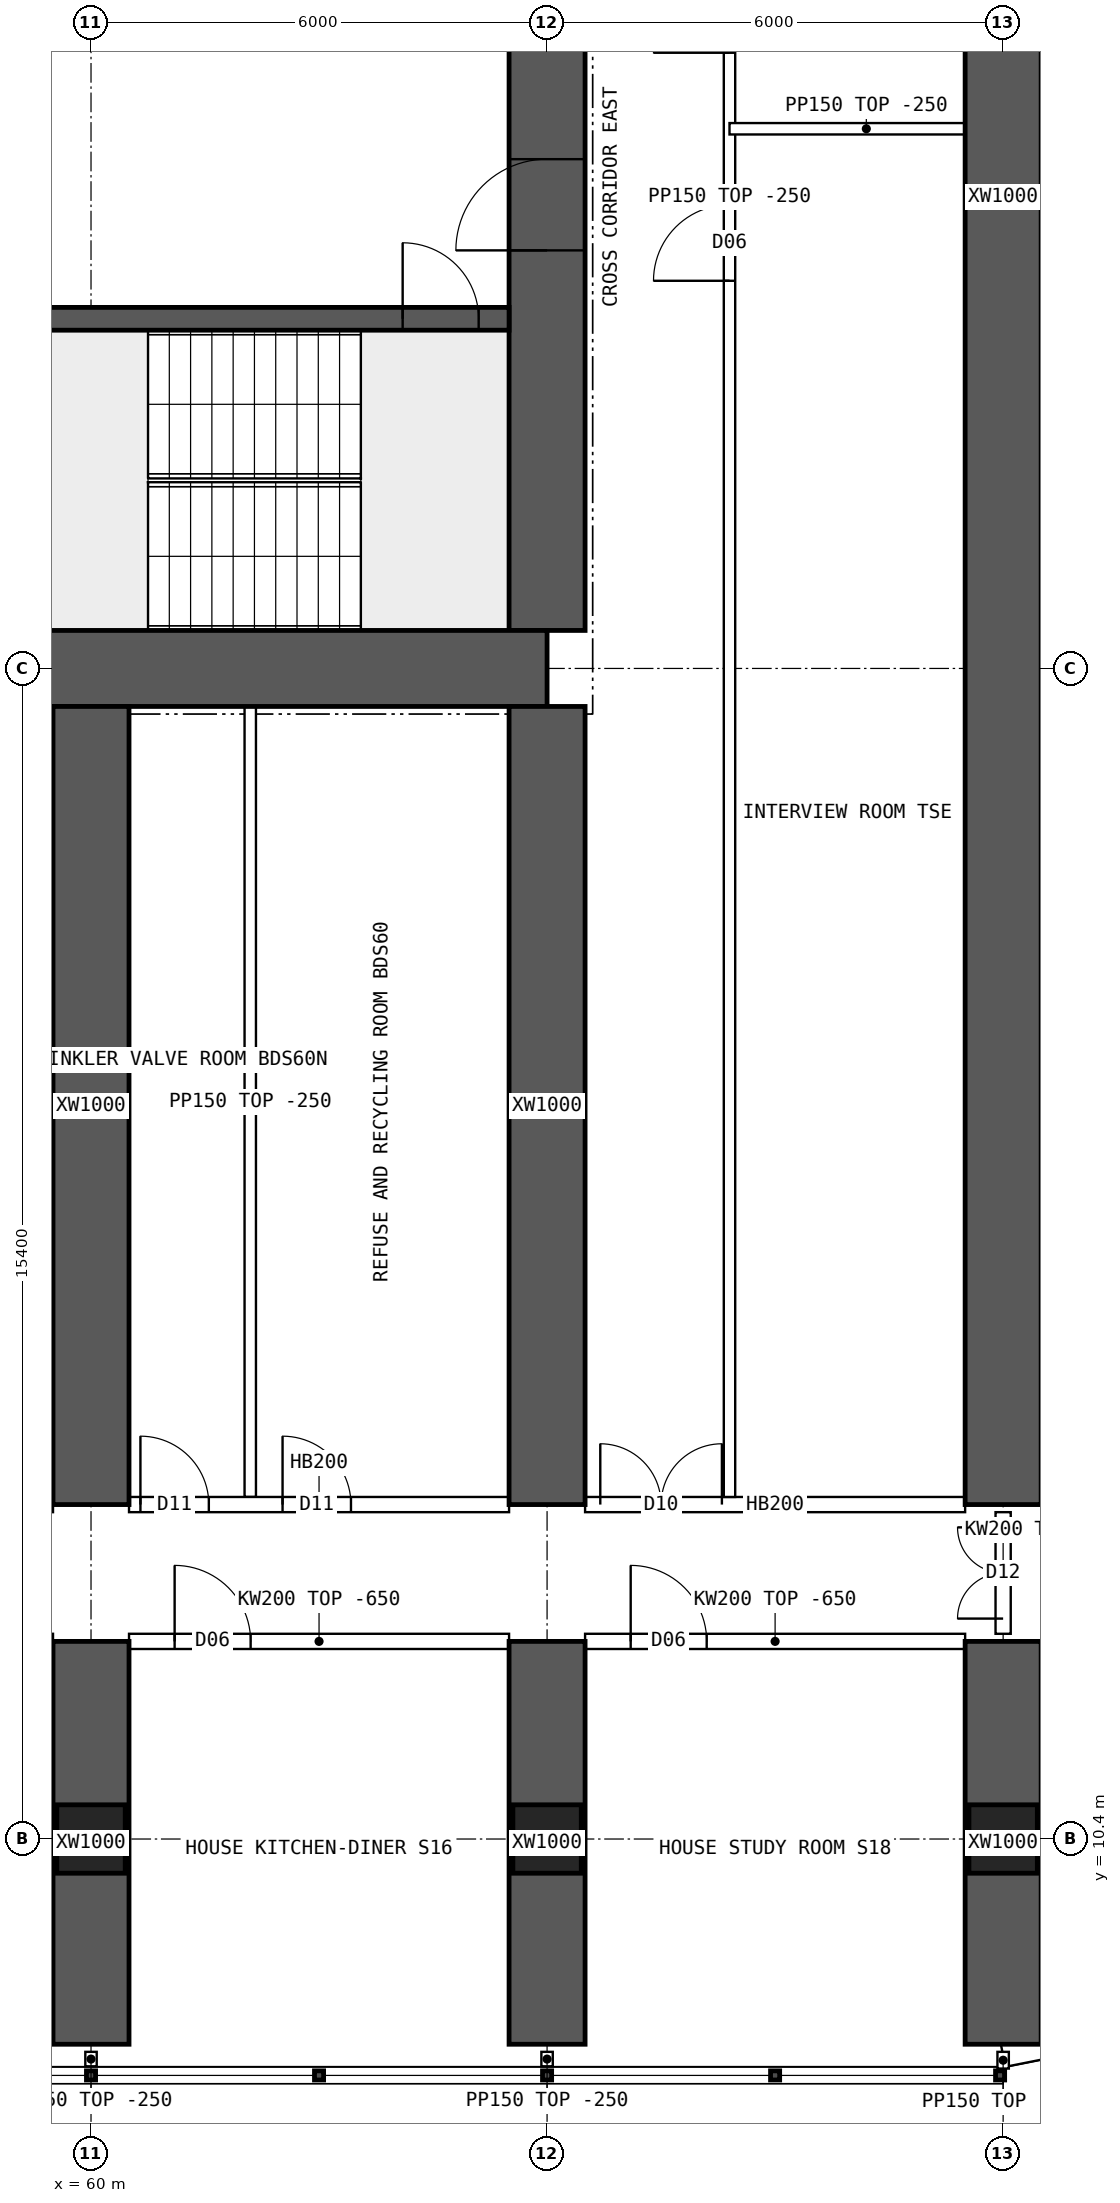
"""IFC4 building model, lengths in metres.
Left out: names, types, materials, properties, quantities, classifications, styles, units other than length and angle.
Written with IfcOpenShell. Run it as: python <this file> out.ifc"""

import sys

from ifc_helpers import new_model, si_unit, direction, frame, frame_2d, origin, origin_2d, place, context, subcontext, project, spatial, polyline, rectangle, hollow_rectangle, outline, extrude, element, fill, save


model = new_model("IFC4")
c1 = context("Model", 3, precision=1e-05, world=origin(), true_north=direction((0.0, 1.0)))
c2 = subcontext(c1, "Body", "Model", "MODEL_VIEW")
j1 = project(units=[si_unit("LENGTHUNIT", "METRE"), si_unit("PLANEANGLEUNIT", "RADIAN")], contexts=[c1])
p1 = place(None, origin())
s1 = spatial("IfcSite", under=j1, at=p1, CompositionType="ELEMENT")
p2 = place(p1, origin())
s2 = spatial("IfcBuilding", under=s1, at=p2, CompositionType="ELEMENT")
p3 = place(p2, frame((0.0, 0.0, 53.95)))
s3 = spatial("IfcBuildingStorey", under=s2, at=p3, CompositionType="ELEMENT", Elevation=53.95)
for number, where, z_axis, x_axis in (
    (1, (60.0, 10.4, 0.0), (0.0, 0.0, 1.0), (1.0, 0.0, 0.0)),
    (2, (66.0, 10.4, 0.0), (0.0, 0.0, 1.0), (1.0, 0.0, 0.0)),
    (3, (72.0, 10.4, 0.0), (0.0, 0.0, 1.0), (1.0, 0.0, 0.0)),
):
    element("IfcColumn", number, at=place(p3, frame(where, z_axis=z_axis, x_axis=x_axis)), inside=s3, PredefinedType="COLUMN", context=c2, shape_type="SweptSolid", body=[
        extrude(hollow_rectangle(XDim=0.9, YDim=0.9, WallThickness=0.09, at=origin_2d()), origin(), (0.0, 0.0, 1.0), 3.75),
    ])
p4 = place(p3, frame((18.0, 25.8, 0.0), z_axis=(0.0, 0.0, 1.0), x_axis=(1.0, 0.0, 0.0)))
e4 = element("IfcWall", 4, at=p4, inside=s3, PredefinedType="SHEAR", context=c2, shape_type="SweptSolid", body=[
    extrude(rectangle(XDim=48.0, YDim=1.0, at=frame_2d((24.0, 0.0))), origin(), (0.0, 0.0, 1.0), 3.75),
])
p5 = place(p3, frame((66.0, 26.3, 0.0), z_axis=(0.0, 0.0, 1.0), x_axis=(0.0, 1.0, 0.0)))
e5 = element("IfcWall", 5, at=p5, inside=s3, PredefinedType="SHEAR", context=c2, shape_type="SweptSolid", body=[
    extrude(rectangle(XDim=11.4, YDim=1.0, at=frame_2d((5.7, 0.0))), origin(), (0.0, 0.0, 1.0), 3.75),
])
p6 = place(p5, frame((5.0, 0.0, 0.0)))
e6 = element("IfcOpeningElement", 6, at=p6, cuts=e5, PredefinedType="OPENING", context=c2, shape_type="SweptSolid", body=[
    extrude(rectangle(XDim=1.2, YDim=2.1, at=frame_2d((0.6, 1.05))), frame((0.0, 0.51, 0.0), z_axis=(0.0, -1.0, 0.0), x_axis=(1.0, 0.0, 0.0)), (0.0, 0.0, 1.0), 1.02),
])
p7 = place(p3, frame((18.5, 30.4, 0.0), z_axis=(0.0, 0.0, 1.0), x_axis=(1.0, 0.0, 0.0)))
e7 = element("IfcWall", 7, at=p7, inside=s3, PredefinedType="SHEAR", context=c2, shape_type="SweptSolid", body=[
    extrude(rectangle(XDim=47.0, YDim=0.3, at=frame_2d((23.5, 0.0))), origin(), (0.0, 0.0, 1.0), 3.75),
])
p8 = place(p7, frame((0.4, 0.0, 0.0)))
e8 = element("IfcOpeningElement", 8, at=p8, cuts=e7, PredefinedType="OPENING", context=c2, shape_type="SweptSolid", body=[
    extrude(rectangle(XDim=1.0, YDim=2.1, at=frame_2d((0.5, 1.05))), frame((0.0, 0.16, 0.0), z_axis=(0.0, -1.0, 0.0), x_axis=(1.0, 0.0, 0.0)), (0.0, 0.0, 1.0), 0.32),
])
p9 = place(p7, frame((45.6, 0.0, 0.0)))
e9 = element("IfcOpeningElement", 9, at=p9, cuts=e7, PredefinedType="OPENING", context=c2, shape_type="SweptSolid", body=[
    extrude(rectangle(XDim=1.0, YDim=2.1, at=frame_2d((0.5, 1.05))), frame((0.0, 0.16, 0.0), z_axis=(0.0, -1.0, 0.0), x_axis=(1.0, 0.0, 0.0)), (0.0, 0.0, 1.0), 0.32),
])
p10 = place(p7, frame((8.25, 0.0, 0.0)))
e10 = element("IfcOpeningElement", 10, at=p10, cuts=e7, PredefinedType="OPENING", context=c2, shape_type="SweptSolid", body=[
    extrude(rectangle(XDim=1.1, YDim=2.1, at=frame_2d((0.55, 1.05))), frame((0.0, 0.16, 0.0), z_axis=(0.0, -1.0, 0.0), x_axis=(1.0, 0.0, 0.0)), (0.0, 0.0, 1.0), 0.32),
])
p11 = place(p7, frame((10.85, 0.0, 0.0)))
e11 = element("IfcOpeningElement", 11, at=p11, cuts=e7, PredefinedType="OPENING", context=c2, shape_type="SweptSolid", body=[
    extrude(rectangle(XDim=1.1, YDim=2.1, at=frame_2d((0.55, 1.05))), frame((0.0, 0.16, 0.0), z_axis=(0.0, -1.0, 0.0), x_axis=(1.0, 0.0, 0.0)), (0.0, 0.0, 1.0), 0.32),
])
p12 = place(p7, frame((13.45, 0.0, 0.0)))
e12 = element("IfcOpeningElement", 12, at=p12, cuts=e7, PredefinedType="OPENING", context=c2, shape_type="SweptSolid", body=[
    extrude(rectangle(XDim=1.1, YDim=2.1, at=frame_2d((0.55, 1.05))), frame((0.0, 0.16, 0.0), z_axis=(0.0, -1.0, 0.0), x_axis=(1.0, 0.0, 0.0)), (0.0, 0.0, 1.0), 0.32),
])
p13 = place(p7, frame((16.05, 0.0, 0.0)))
e13 = element("IfcOpeningElement", 13, at=p13, cuts=e7, PredefinedType="OPENING", context=c2, shape_type="SweptSolid", body=[
    extrude(rectangle(XDim=1.1, YDim=2.1, at=frame_2d((0.55, 1.05))), frame((0.0, 0.16, 0.0), z_axis=(0.0, -1.0, 0.0), x_axis=(1.0, 0.0, 0.0)), (0.0, 0.0, 1.0), 0.32),
])
p14 = place(p7, frame((30.117, 0.0, 0.0)))
e14 = element("IfcOpeningElement", 14, at=p14, cuts=e7, PredefinedType="OPENING", context=c2, shape_type="SweptSolid", body=[
    extrude(rectangle(XDim=1.1, YDim=2.1, at=frame_2d((0.55, 1.05))), frame((0.0, 0.16, 0.0), z_axis=(0.0, -1.0, 0.0), x_axis=(1.0, 0.0, 0.0)), (0.0, 0.0, 1.0), 0.32),
])
p15 = place(p7, frame((33.65, 0.0, 0.0)))
e15 = element("IfcOpeningElement", 15, at=p15, cuts=e7, PredefinedType="OPENING", context=c2, shape_type="SweptSolid", body=[
    extrude(rectangle(XDim=1.1, YDim=2.1, at=frame_2d((0.55, 1.05))), frame((0.0, 0.16, 0.0), z_axis=(0.0, -1.0, 0.0), x_axis=(1.0, 0.0, 0.0)), (0.0, 0.0, 1.0), 0.32),
])
p16 = place(p7, frame((37.183, 0.0, 0.0)))
e16 = element("IfcOpeningElement", 16, at=p16, cuts=e7, PredefinedType="OPENING", context=c2, shape_type="SweptSolid", body=[
    extrude(rectangle(XDim=1.1, YDim=2.1, at=frame_2d((0.55, 1.05))), frame((0.0, 0.16, 0.0), z_axis=(0.0, -1.0, 0.0), x_axis=(1.0, 0.0, 0.0)), (0.0, 0.0, 1.0), 0.32),
])
p17 = place(p3, frame((60.0, 7.7, 0.0), z_axis=(0.0, 0.0, 1.0), x_axis=(0.0, 1.0, 0.0)))
e17 = element("IfcWall", 17, at=p17, inside=s3, PredefinedType="SHEAR", context=c2, shape_type="SweptSolid", body=[
    extrude(rectangle(XDim=5.3, YDim=1.0, at=frame_2d((2.65, 0.0))), origin(), (0.0, 0.0, 1.0), 3.75),
])
p18 = place(p3, frame((60.0, 14.8, 0.0), z_axis=(0.0, 0.0, 1.0), x_axis=(0.0, 1.0, 0.0)))
e18 = element("IfcWall", 18, at=p18, inside=s3, PredefinedType="SHEAR", context=c2, shape_type="SweptSolid", body=[
    extrude(rectangle(XDim=10.5, YDim=1.0, at=frame_2d((5.25, 0.0))), origin(), (0.0, 0.0, 1.0), 3.75),
])
p19 = place(p3, frame((66.0, 7.7, 0.0), z_axis=(0.0, 0.0, 1.0), x_axis=(0.0, 1.0, 0.0)))
e19 = element("IfcWall", 19, at=p19, inside=s3, PredefinedType="SHEAR", context=c2, shape_type="SweptSolid", body=[
    extrude(rectangle(XDim=5.3, YDim=1.0, at=frame_2d((2.65, 0.0))), origin(), (0.0, 0.0, 1.0), 3.75),
])
p20 = place(p3, frame((66.0, 14.8, 0.0), z_axis=(0.0, 0.0, 1.0), x_axis=(0.0, 1.0, 0.0)))
e20 = element("IfcWall", 20, at=p20, inside=s3, PredefinedType="SHEAR", context=c2, shape_type="SweptSolid", body=[
    extrude(rectangle(XDim=10.5, YDim=1.0, at=frame_2d((5.25, 0.0))), origin(), (0.0, 0.0, 1.0), 3.75),
])
p21 = place(p3, frame((72.0, 7.7, 0.0), z_axis=(0.0, 0.0, 1.0), x_axis=(0.0, 1.0, 0.0)))
e21 = element("IfcWall", 21, at=p21, inside=s3, PredefinedType="SHEAR", context=c2, shape_type="SweptSolid", body=[
    extrude(rectangle(XDim=5.3, YDim=1.0, at=frame_2d((2.65, 0.0))), origin(), (0.0, 0.0, 1.0), 3.75),
])
p22 = place(p3, frame((72.0, 14.8, 0.0), z_axis=(0.0, 0.0, 1.0), x_axis=(0.0, 1.0, 0.0)))
e22 = element("IfcWall", 22, at=p22, inside=s3, PredefinedType="SHEAR", context=c2, shape_type="SweptSolid", body=[
    extrude(rectangle(XDim=34.4, YDim=1.0, at=frame_2d((17.2, 0.0))), origin(), (0.0, 0.0, 1.0), 3.75),
])
p23 = place(p3, frame((72.0, 7.55, 0.0), z_axis=(0.0, 0.0, 1.0), x_axis=(0.980787251524, 0.195080412259, 0.0)))
e23 = element("IfcWall", 23, at=p23, inside=s3, PredefinedType="SOLIDWALL", context=c2, shape_type="SweptSolid", body=[
    extrude(outline(polyline([(-0.03, -0.15), (3.249, -0.15), (3.189, 0.15), (0.03, 0.15), (-0.03, -0.15)])), origin(), (0.0, 0.0, 1.0), 3.5),
])
p24 = place(p23, frame((0.909, 0.0, 0.9)))
e24 = element("IfcOpeningElement", 24, at=p24, cuts=e23, PredefinedType="OPENING", context=c2, shape_type="SweptSolid", body=[
    extrude(rectangle(XDim=1.4, YDim=1.8, at=frame_2d((0.7, 0.9))), frame((0.0, 0.16, 0.0), z_axis=(0.0, -1.0, 0.0), x_axis=(1.0, 0.0, 0.0)), (0.0, 0.0, 1.0), 0.32),
])
p25 = place(p3, frame((60.5, 13.0, 0.0), z_axis=(0.0, 0.0, 1.0), x_axis=(1.0, 0.0, 0.0)))
e25 = element("IfcWall", 25, at=p25, inside=s3, PredefinedType="SOLIDWALL", context=c2, shape_type="SweptSolid", body=[
    extrude(outline(polyline([(0.0, 0.0), (5.0, 0.0), (5.0, 3.1), (0.0, 3.1), (0.0, 0.0)])), frame((0.0, 0.1, 0.0), z_axis=(0.0, -1.0, 0.0), x_axis=(1.0, 0.0, 0.0)), (0.0, 0.0, 1.0), 0.2),
])
p26 = place(p25, frame((0.6, 0.0, 0.0)))
e26 = element("IfcOpeningElement", 26, at=p26, cuts=e25, PredefinedType="OPENING", context=c2, shape_type="SweptSolid", body=[
    extrude(rectangle(XDim=1.0, YDim=2.1, at=frame_2d((0.5, 1.05))), frame((0.0, 0.11, 0.0), z_axis=(0.0, -1.0, 0.0), x_axis=(1.0, 0.0, 0.0)), (0.0, 0.0, 1.0), 0.22),
])
p27 = place(p3, frame((60.5, 14.8, 0.0), z_axis=(0.0, 0.0, 1.0), x_axis=(1.0, 0.0, 0.0)))
e27 = element("IfcWall", 27, at=p27, inside=s3, PredefinedType="SOLIDWALL", context=c2, shape_type="SweptSolid", body=[
    extrude(rectangle(XDim=5.0, YDim=0.2, at=frame_2d((2.5, 0.0))), origin(), (0.0, 0.0, 1.0), 3.5),
])
p28 = place(p27, frame((0.15, 0.0, 0.0)))
e28 = element("IfcOpeningElement", 28, at=p28, cuts=e27, PredefinedType="OPENING", context=c2, shape_type="SweptSolid", body=[
    extrude(rectangle(XDim=0.9, YDim=2.1, at=frame_2d((0.45, 1.05))), frame((0.0, 0.11, 0.0), z_axis=(0.0, -1.0, 0.0), x_axis=(1.0, 0.0, 0.0)), (0.0, 0.0, 1.0), 0.22),
])
p29 = place(p27, frame((2.02, 0.0, 0.0)))
e29 = element("IfcOpeningElement", 29, at=p29, cuts=e27, PredefinedType="OPENING", context=c2, shape_type="SweptSolid", body=[
    extrude(rectangle(XDim=0.9, YDim=2.1, at=frame_2d((0.45, 1.05))), frame((0.0, 0.11, 0.0), z_axis=(0.0, -1.0, 0.0), x_axis=(1.0, 0.0, 0.0)), (0.0, 0.0, 1.0), 0.22),
])
p30 = place(p3, frame((66.5, 13.0, 0.0), z_axis=(0.0, 0.0, 1.0), x_axis=(1.0, 0.0, 0.0)))
e30 = element("IfcWall", 30, at=p30, inside=s3, PredefinedType="SOLIDWALL", context=c2, shape_type="SweptSolid", body=[
    extrude(outline(polyline([(0.0, 0.0), (5.0, 0.0), (5.0, 3.1), (0.0, 3.1), (0.0, 0.0)])), frame((0.0, 0.1, 0.0), z_axis=(0.0, -1.0, 0.0), x_axis=(1.0, 0.0, 0.0)), (0.0, 0.0, 1.0), 0.2),
])
p31 = place(p30, frame((0.6, 0.0, 0.0)))
e31 = element("IfcOpeningElement", 31, at=p31, cuts=e30, PredefinedType="OPENING", context=c2, shape_type="SweptSolid", body=[
    extrude(rectangle(XDim=1.0, YDim=2.1, at=frame_2d((0.5, 1.05))), frame((0.0, 0.11, 0.0), z_axis=(0.0, -1.0, 0.0), x_axis=(1.0, 0.0, 0.0)), (0.0, 0.0, 1.0), 0.22),
])
p32 = place(p3, frame((66.5, 14.8, 0.0), z_axis=(0.0, 0.0, 1.0), x_axis=(1.0, 0.0, 0.0)))
e32 = element("IfcWall", 32, at=p32, inside=s3, PredefinedType="SOLIDWALL", context=c2, shape_type="SweptSolid", body=[
    extrude(rectangle(XDim=5.0, YDim=0.2, at=frame_2d((2.5, 0.0))), origin(), (0.0, 0.0, 1.0), 3.5),
])
p33 = place(p32, frame((0.2, 0.0, 0.0)))
e33 = element("IfcOpeningElement", 33, at=p33, cuts=e32, PredefinedType="OPENING", context=c2, shape_type="SweptSolid", body=[
    extrude(rectangle(XDim=1.6, YDim=2.1, at=frame_2d((0.8, 1.05))), frame((0.0, 0.11, 0.0), z_axis=(0.0, -1.0, 0.0), x_axis=(1.0, 0.0, 0.0)), (0.0, 0.0, 1.0), 0.22),
])
p34 = place(p3, frame((62.095, 14.9, 0.0), z_axis=(0.0, 0.0, 1.0), x_axis=(0.0, 1.0, 0.0)))
e34 = element("IfcWall", 34, at=p34, inside=s3, PredefinedType="PARTITIONING", context=c2, shape_type="SweptSolid", body=[
    extrude(rectangle(XDim=10.4, YDim=0.15, at=frame_2d((5.2, 0.0))), origin(), (0.0, 0.0, 1.0), 3.5),
])
p35 = place(p3, frame((68.4, 14.9, 0.0), z_axis=(0.0, 0.0, 1.0), x_axis=(0.0, 1.0, 0.0)))
e35 = element("IfcWall", 35, at=p35, inside=s3, PredefinedType="PARTITIONING", context=c2, shape_type="SweptSolid", body=[
    extrude(rectangle(XDim=34.2, YDim=0.15, at=frame_2d((17.1, 0.0))), origin(), (0.0, 0.0, 1.0), 3.5),
])
p36 = place(p35, frame((16.0, 0.0, 0.0)))
e36 = element("IfcOpeningElement", 36, at=p36, cuts=e35, PredefinedType="OPENING", context=c2, shape_type="SweptSolid", body=[
    extrude(rectangle(XDim=1.0, YDim=2.1, at=frame_2d((0.5, 1.05))), frame((0.0, 0.085, 0.0), z_axis=(0.0, -1.0, 0.0), x_axis=(1.0, 0.0, 0.0)), (0.0, 0.0, 1.0), 0.17),
])
p37 = place(p35, frame((19.0, 0.0, 0.0)))
e37 = element("IfcOpeningElement", 37, at=p37, cuts=e35, PredefinedType="OPENING", context=c2, shape_type="SweptSolid", body=[
    extrude(rectangle(XDim=1.0, YDim=2.1, at=frame_2d((0.5, 1.05))), frame((0.0, 0.085, 0.0), z_axis=(0.0, -1.0, 0.0), x_axis=(1.0, 0.0, 0.0)), (0.0, 0.0, 1.0), 0.17),
])
p38 = place(p3, frame((68.4, 32.9, 0.0), z_axis=(0.0, 0.0, 1.0), x_axis=(1.0, 0.0, 0.0)))
e38 = element("IfcWall", 38, at=p38, inside=s3, PredefinedType="PARTITIONING", context=c2, shape_type="SweptSolid", body=[
    extrude(rectangle(XDim=3.6, YDim=0.15, at=frame_2d((1.8, 0.0))), origin(), (0.0, 0.0, 1.0), 3.5),
])
p39 = place(p3, frame((72.075, 30.85, 0.0), z_axis=(0.0, 0.0, 1.0), x_axis=(1.0, 0.0, 0.0)))
e39 = element("IfcWall", 39, at=p39, inside=s3, PredefinedType="PARTITIONING", context=c2, shape_type="SweptSolid", body=[
    extrude(outline(polyline([(0.0, 0.0), (8.02, 0.0), (8.02, 3.5), (6.227, 3.5), (6.225, 3.05), (5.627, 3.05), (5.625, 3.5), (0.0, 3.5), (0.0, 0.0)])), frame((0.0, 0.075, 0.0), z_axis=(0.0, -1.0, 0.0), x_axis=(1.0, 0.0, 0.0)), (0.0, 0.0, 1.0), 0.15),
])
p40 = place(p3, frame((72.0, 13.1, 0.0), z_axis=(0.0, 0.0, 1.0), x_axis=(0.0, 1.0, 0.0)))
e40 = element("IfcWall", 40, at=p40, inside=s3, PredefinedType="SOLIDWALL", context=c2, shape_type="SweptSolid", body=[
    extrude(outline(polyline([(0.0, 0.0), (1.6, 0.0), (1.6, 3.05), (0.0, 3.05), (0.0, 0.0)])), frame((0.0, 0.1, 0.0), z_axis=(0.0, -1.0, 0.0), x_axis=(1.0, 0.0, 0.0)), (0.0, 0.0, 1.0), 0.2),
])
p41 = place(p40, frame((0.2, 0.0, 0.0)))
e41 = element("IfcOpeningElement", 41, at=p41, cuts=e40, PredefinedType="OPENING", context=c2, shape_type="SweptSolid", body=[
    extrude(rectangle(XDim=1.2, YDim=2.1, at=frame_2d((0.6, 1.05))), frame((0.0, 0.11, 0.0), z_axis=(0.0, -1.0, 0.0), x_axis=(1.0, 0.0, 0.0)), (0.0, 0.0, 1.0), 0.22),
])
for number, where, z_axis, x_axis in (
    (42, (60.0, 7.6, 0.0), (0.0, 0.0, 1.0), (0.0, -1.0, 0.0)),
    (43, (66.0, 7.6, 0.0), (0.0, 0.0, 1.0), (0.0, -1.0, 0.0)),
):
    element("IfcWall", number, at=place(p3, frame(where, z_axis=z_axis, x_axis=x_axis)), inside=s3, PredefinedType="PARTITIONING", context=c2, shape_type="SweptSolid", body=[
        extrude(rectangle(XDim=0.19, YDim=0.15, at=frame_2d((0.095, 0.0))), origin(), (0.0, 0.0, 1.0), 3.5),
    ])
p42 = place(p3, frame((72.0, 7.6, 0.0), z_axis=(0.0, 0.0, 1.0), x_axis=(0.0, -1.0, 0.0)))
e44 = element("IfcWall", 44, at=p42, inside=s3, PredefinedType="PARTITIONING", context=c2, shape_type="SweptSolid", body=[
    extrude(rectangle(XDim=0.22, YDim=0.15, at=frame_2d((0.11, 0.0))), origin(), (0.0, 0.0, 1.0), 3.5),
])
p43 = place(p6, origin())
e45 = element("IfcDoor", 45, at=p43, inside=s3, OperationType="SINGLE_SWING_LEFT", PredefinedType="DOOR", context=c2, shape_type="SweptSolid", body=[
    extrude(rectangle(XDim=1.2, YDim=2.1, at=frame_2d((0.6, 1.05))), frame((0.0, 0.025, 0.0), z_axis=(0.0, -1.0, 0.0), x_axis=(1.0, 0.0, 0.0)), (0.0, 0.0, 1.0), 0.05),
])
fill(e6, e45)
p44 = place(p9, origin())
e46 = element("IfcDoor", 46, at=p44, inside=s3, OperationType="SINGLE_SWING_LEFT", PredefinedType="DOOR", context=c2, shape_type="SweptSolid", body=[
    extrude(rectangle(XDim=1.0, YDim=2.1, at=frame_2d((0.5, 1.05))), frame((0.0, 0.025, 0.0), z_axis=(0.0, -1.0, 0.0), x_axis=(1.0, 0.0, 0.0)), (0.0, 0.0, 1.0), 0.05),
])
fill(e9, e46)
p45 = place(p33, origin())
e47 = element("IfcDoor", 47, at=p45, inside=s3, OperationType="DOUBLE_DOOR_SINGLE_SWING", PredefinedType="DOOR", context=c2, shape_type="SweptSolid", body=[
    extrude(rectangle(XDim=1.6, YDim=2.1, at=frame_2d((0.8, 1.05))), frame((0.0, 0.025, 0.0), z_axis=(0.0, -1.0, 0.0), x_axis=(1.0, 0.0, 0.0)), (0.0, 0.0, 1.0), 0.05),
])
fill(e33, e47)
p46 = place(p26, origin())
e48 = element("IfcDoor", 48, at=p46, inside=s3, OperationType="SINGLE_SWING_LEFT", PredefinedType="DOOR", context=c2, shape_type="SweptSolid", body=[
    extrude(rectangle(XDim=1.0, YDim=2.1, at=frame_2d((0.5, 1.05))), frame((0.0, 0.025, 0.0), z_axis=(0.0, -1.0, 0.0), x_axis=(1.0, 0.0, 0.0)), (0.0, 0.0, 1.0), 0.05),
])
fill(e26, e48)
p47 = place(p31, origin())
e49 = element("IfcDoor", 49, at=p47, inside=s3, OperationType="SINGLE_SWING_LEFT", PredefinedType="DOOR", context=c2, shape_type="SweptSolid", body=[
    extrude(rectangle(XDim=1.0, YDim=2.1, at=frame_2d((0.5, 1.05))), frame((0.0, 0.025, 0.0), z_axis=(0.0, -1.0, 0.0), x_axis=(1.0, 0.0, 0.0)), (0.0, 0.0, 1.0), 0.05),
])
fill(e31, e49)
p48 = place(p28, origin())
e50 = element("IfcDoor", 50, at=p48, inside=s3, OperationType="SINGLE_SWING_LEFT", PredefinedType="DOOR", context=c2, shape_type="SweptSolid", body=[
    extrude(rectangle(XDim=0.9, YDim=2.1, at=frame_2d((0.45, 1.05))), frame((0.0, 0.025, 0.0), z_axis=(0.0, -1.0, 0.0), x_axis=(1.0, 0.0, 0.0)), (0.0, 0.0, 1.0), 0.05),
])
fill(e28, e50)
p49 = place(p29, origin())
e51 = element("IfcDoor", 51, at=p49, inside=s3, OperationType="SINGLE_SWING_LEFT", PredefinedType="DOOR", context=c2, shape_type="SweptSolid", body=[
    extrude(rectangle(XDim=0.9, YDim=2.1, at=frame_2d((0.45, 1.05))), frame((0.0, 0.025, 0.0), z_axis=(0.0, -1.0, 0.0), x_axis=(1.0, 0.0, 0.0)), (0.0, 0.0, 1.0), 0.05),
])
fill(e29, e51)
p50 = place(p36, origin())
e52 = element("IfcDoor", 52, at=p50, inside=s3, OperationType="SINGLE_SWING_LEFT", PredefinedType="DOOR", context=c2, shape_type="SweptSolid", body=[
    extrude(rectangle(XDim=1.0, YDim=2.1, at=frame_2d((0.5, 1.05))), frame((0.0, 0.025, 0.0), z_axis=(0.0, -1.0, 0.0), x_axis=(1.0, 0.0, 0.0)), (0.0, 0.0, 1.0), 0.05),
])
fill(e36, e52)
p51 = place(p41, origin())
e53 = element("IfcDoor", 53, at=p51, inside=s3, OperationType="DOUBLE_DOOR_SINGLE_SWING", PredefinedType="DOOR", context=c2, shape_type="SweptSolid", body=[
    extrude(rectangle(XDim=1.2, YDim=2.1, at=frame_2d((0.6, 1.05))), frame((0.0, 0.025, 0.0), z_axis=(0.0, -1.0, 0.0), x_axis=(1.0, 0.0, 0.0)), (0.0, 0.0, 1.0), 0.05),
])
fill(e41, e53)
save(model, sys.argv[1])
